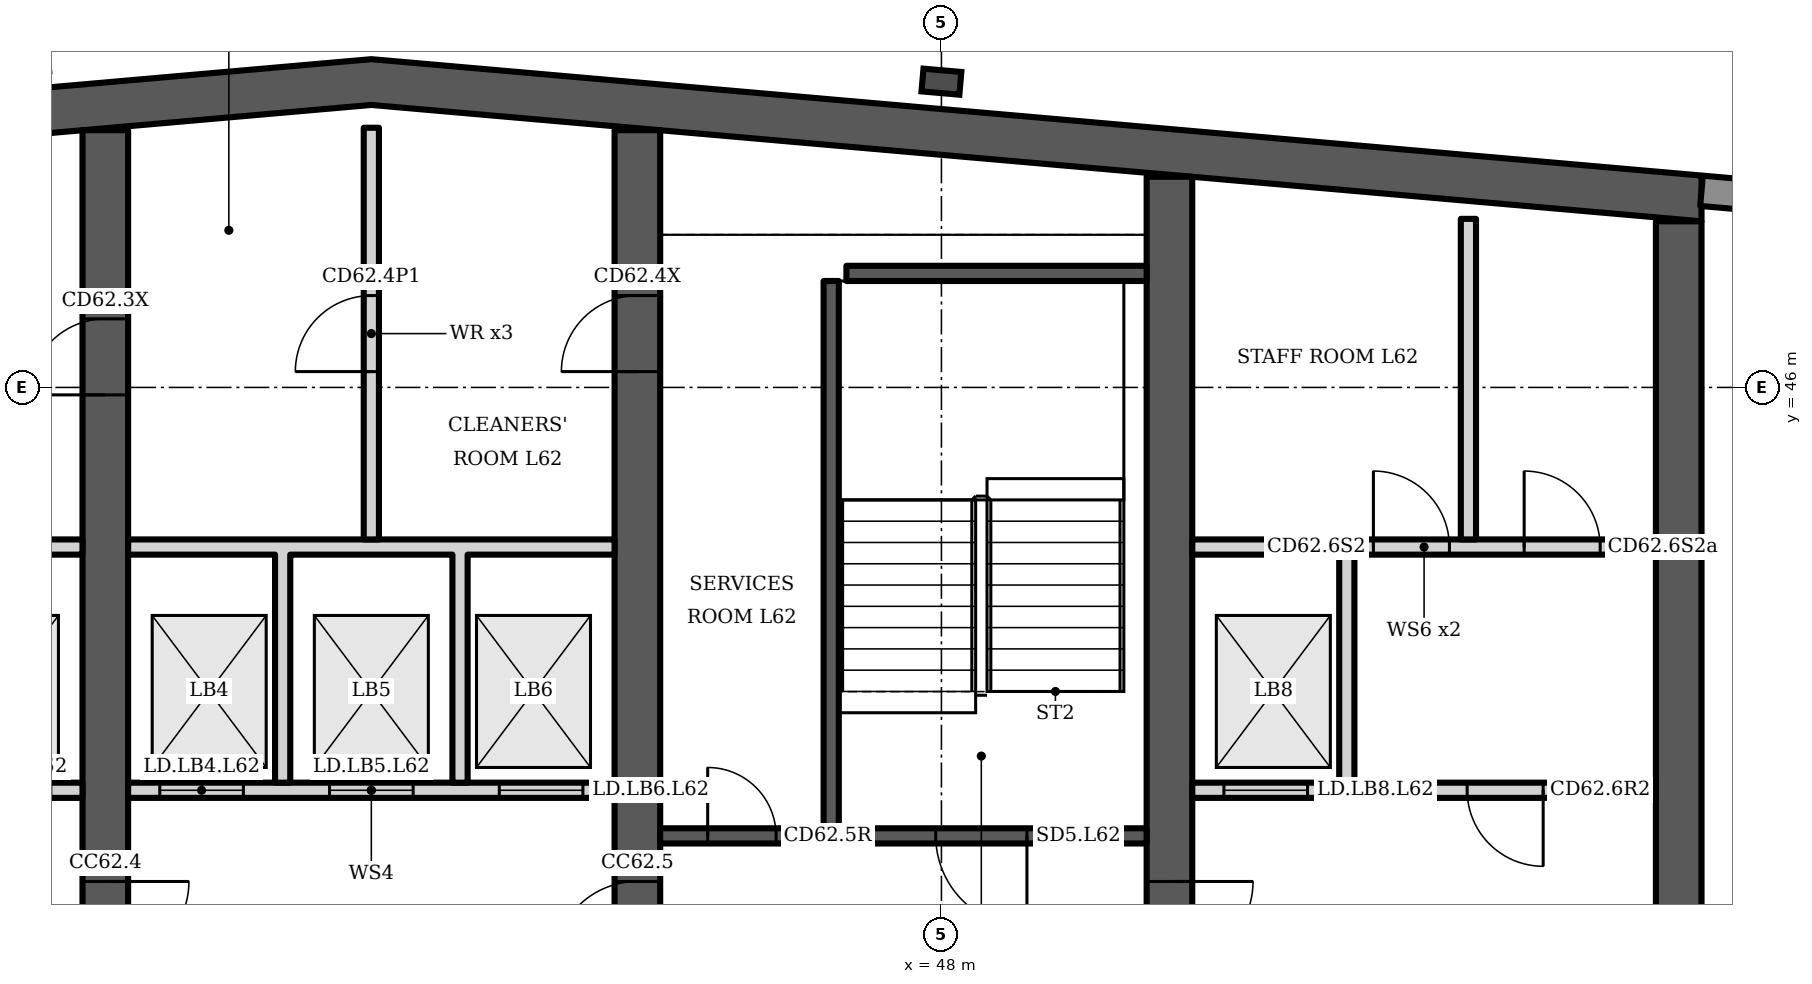
"""IFC4 building model, lengths in metres.
Left out: names, types, materials, properties, quantities, classifications, styles, units other than length and angle.
Written with IfcOpenShell. Run it as: python <this file> out.ifc"""

import sys

from ifc_helpers import new_model, si_unit, direction, frame, frame_2d, origin, origin_2d, place, context, subcontext, project, spatial, polyline, rectangle, i_section, outline, extrude, element, fill, save


model = new_model("IFC4")
c1 = context("Model", 3, precision=1e-05, world=origin(), true_north=direction((0.0, 1.0)))
c2 = subcontext(c1, "Body", "Model", "MODEL_VIEW")
j1 = project(units=[si_unit("LENGTHUNIT", "METRE"), si_unit("PLANEANGLEUNIT", "RADIAN")], contexts=[c1])
p1 = place(None, origin())
s1 = spatial("IfcSite", under=j1, at=p1, CompositionType="ELEMENT")
p2 = place(p1, origin())
s2 = spatial("IfcBuilding", under=s1, at=p2, CompositionType="ELEMENT")
p3 = place(p2, frame((0.0, 0.0, 246.7)))
s3 = spatial("IfcBuildingStorey", under=s2, at=p3, CompositionType="ELEMENT", Elevation=246.7)
p4 = place(p3, origin())
e1 = element("IfcWall", 1, at=p4, inside=s3, PredefinedType="SHEAR", context=c2, shape_type="SweptSolid", body=[
    extrude(outline(polyline([(23.0, 48.185), (40.5, 49.716), (58.0, 48.185), (58.0, 48.787), (40.5, 50.318), (23.0, 48.787), (23.0, 48.185)])), origin(), (0.0, 0.0, 1.0), 3.6),
])
p5 = place(p3, frame((37.0, 34.6, 0.0), z_axis=(0.0, 0.0, 1.0), x_axis=(0.0, 1.0, 0.0)))
e2 = element("IfcWall", 2, at=p5, inside=s3, PredefinedType="SHEAR", context=c2, shape_type="SweptSolid", body=[
    extrude(rectangle(XDim=14.784, YDim=0.6, at=frame_2d((7.392, 0.0))), origin(), (0.0, 0.0, 1.0), 3.6),
])
p6 = place(p5, frame((11.302, 0.0, 0.0)))
e3 = element("IfcOpeningElement", 3, at=p6, cuts=e2, PredefinedType="OPENING", context=c2, shape_type="SweptSolid", body=[
    extrude(rectangle(XDim=1.0, YDim=2.1, at=frame_2d((0.5, 1.05))), frame((0.0, 0.31, 0.0), z_axis=(0.0, -1.0, 0.0), x_axis=(1.0, 0.0, 0.0)), (0.0, 0.0, 1.0), 0.62),
])
p7 = place(p5, frame((3.8, 0.0, 0.0)))
e4 = element("IfcOpeningElement", 4, at=p7, cuts=e2, PredefinedType="OPENING", context=c2, shape_type="SweptSolid", body=[
    extrude(rectangle(XDim=1.1, YDim=2.1, at=frame_2d((0.55, 1.05))), frame((0.0, 0.31, 0.0), z_axis=(0.0, -1.0, 0.0), x_axis=(1.0, 0.0, 0.0)), (0.0, 0.0, 1.0), 0.62),
])
p8 = place(p3, frame((44.0, 34.6, 0.0), z_axis=(0.0, 0.0, 1.0), x_axis=(0.0, 1.0, 0.0)))
e5 = element("IfcWall", 5, at=p8, inside=s3, PredefinedType="SHEAR", context=c2, shape_type="SweptSolid", body=[
    extrude(rectangle(XDim=14.784, YDim=0.6, at=frame_2d((7.392, 0.0))), origin(), (0.0, 0.0, 1.0), 3.6),
])
p9 = place(p8, frame((11.608, 0.0, 0.0)))
e6 = element("IfcOpeningElement", 6, at=p9, cuts=e5, PredefinedType="OPENING", context=c2, shape_type="SweptSolid", body=[
    extrude(rectangle(XDim=1.0, YDim=2.1, at=frame_2d((0.5, 1.05))), frame((0.0, 0.31, 0.0), z_axis=(0.0, -1.0, 0.0), x_axis=(1.0, 0.0, 0.0)), (0.0, 0.0, 1.0), 0.62),
])
p10 = place(p8, frame((3.8, 0.0, 0.0)))
e7 = element("IfcOpeningElement", 7, at=p10, cuts=e5, PredefinedType="OPENING", context=c2, shape_type="SweptSolid", body=[
    extrude(rectangle(XDim=1.1, YDim=2.1, at=frame_2d((0.55, 1.05))), frame((0.0, 0.31, 0.0), z_axis=(0.0, -1.0, 0.0), x_axis=(1.0, 0.0, 0.0)), (0.0, 0.0, 1.0), 0.62),
])
p11 = place(p3, frame((51.0, 34.6, 0.0), z_axis=(0.0, 0.0, 1.0), x_axis=(0.0, 1.0, 0.0)))
e8 = element("IfcWall", 8, at=p11, inside=s3, PredefinedType="SHEAR", context=c2, shape_type="SweptSolid", body=[
    extrude(rectangle(XDim=14.171, YDim=0.6, at=frame_2d((7.085, 0.0))), origin(), (0.0, 0.0, 1.0), 3.6),
])
p12 = place(p11, frame((3.8, 0.0, 0.0)))
e9 = element("IfcOpeningElement", 9, at=p12, cuts=e8, PredefinedType="OPENING", context=c2, shape_type="SweptSolid", body=[
    extrude(rectangle(XDim=1.1, YDim=2.1, at=frame_2d((0.55, 1.05))), frame((0.0, 0.31, 0.0), z_axis=(0.0, -1.0, 0.0), x_axis=(1.0, 0.0, 0.0)), (0.0, 0.0, 1.0), 0.62),
])
p13 = place(p3, frame((57.7, 34.6, 0.0), z_axis=(0.0, 0.0, 1.0), x_axis=(0.0, 1.0, 0.0)))
e10 = element("IfcWall", 10, at=p13, inside=s3, PredefinedType="SHEAR", context=c2, shape_type="SweptSolid", body=[
    extrude(rectangle(XDim=13.585, YDim=0.6, at=frame_2d((6.792, 0.0))), origin(), (0.0, 0.0, 1.0), 3.6),
])
p14 = place(p3, frame((48.0, 50.022, 0.0), z_axis=(0.0, 0.0, 1.0), x_axis=(0.087156, 0.996197, 0.0)))
e11 = element("IfcColumn", 11, at=p14, inside=s3, PredefinedType="COLUMN", context=c2, shape_type="SweptSolid", body=[
    extrude(i_section(OverallWidth=0.3, OverallDepth=0.5, WebThickness=0.014, FlangeThickness=0.028, FilletRadius=0.027, at=origin_2d()), origin(), (0.0, 0.0, 1.0), 3.6),
])
p15 = place(p3, frame((60.983, 48.326, 0.0), z_axis=(0.0, 0.0, 1.0), x_axis=(-0.996194, 0.087168, 0.0)))
e12 = element("IfcWall", 12, at=p15, inside=s3, PredefinedType="SOLIDWALL", context=c2, shape_type="SweptSolid", body=[
    extrude(rectangle(XDim=2.994, YDim=0.4, at=frame_2d((1.497, 0.0))), origin(), (0.0, 0.0, 1.0), 3.2),
])
p16 = place(p3, frame((30.3, 40.7, 0.0), z_axis=(0.0, 0.0, 1.0), x_axis=(1.0, 0.0, 0.0)))
e13 = element("IfcWall", 13, at=p16, inside=s3, PredefinedType="PARTITIONING", context=c2, shape_type="SweptSolid", body=[
    extrude(rectangle(XDim=6.4, YDim=0.2, at=frame_2d((3.2, 0.0))), origin(), (0.0, 0.0, 1.0), 3.2),
])
p17 = place(p16, frame((0.417, 0.0, 0.0)))
e14 = element("IfcOpeningElement", 14, at=p17, cuts=e13, PredefinedType="OPENING", context=c2, shape_type="SweptSolid", body=[
    extrude(rectangle(XDim=1.1, YDim=2.1, at=frame_2d((0.55, 1.05))), frame((0.0, 0.11, 0.0), z_axis=(0.0, -1.0, 0.0), x_axis=(1.0, 0.0, 0.0)), (0.0, 0.0, 1.0), 0.22),
])
p18 = place(p16, frame((2.65, 0.0, 0.0)))
e15 = element("IfcOpeningElement", 15, at=p18, cuts=e13, PredefinedType="OPENING", context=c2, shape_type="SweptSolid", body=[
    extrude(rectangle(XDim=1.1, YDim=2.1, at=frame_2d((0.55, 1.05))), frame((0.0, 0.11, 0.0), z_axis=(0.0, -1.0, 0.0), x_axis=(1.0, 0.0, 0.0)), (0.0, 0.0, 1.0), 0.22),
])
p19 = place(p16, frame((4.883, 0.0, 0.0)))
e16 = element("IfcOpeningElement", 16, at=p19, cuts=e13, PredefinedType="OPENING", context=c2, shape_type="SweptSolid", body=[
    extrude(rectangle(XDim=1.1, YDim=2.1, at=frame_2d((0.55, 1.05))), frame((0.0, 0.11, 0.0), z_axis=(0.0, -1.0, 0.0), x_axis=(1.0, 0.0, 0.0)), (0.0, 0.0, 1.0), 0.22),
])
p20 = place(p3, frame((0.0, 0.0, -0.0)))
e17 = element("IfcWall", 17, at=p20, inside=s3, PredefinedType="PARTITIONING", context=c2, shape_type="SweptSolid", body=[
    extrude(outline(polyline([(32.433, 40.8), (32.233, 40.8), (32.233, 43.8), (30.3, 43.8), (30.3, 44.0), (36.7, 44.0), (36.7, 43.8), (34.767, 43.8), (34.767, 40.8), (34.567, 40.8), (34.567, 43.8), (32.433, 43.8), (32.433, 40.8)])), origin(), (0.0, 0.0, 1.0), 3.2),
])
p21 = place(p3, frame((37.3, 40.7, 0.0), z_axis=(0.0, 0.0, 1.0), x_axis=(1.0, 0.0, 0.0)))
e18 = element("IfcWall", 18, at=p21, inside=s3, PredefinedType="PARTITIONING", context=c2, shape_type="SweptSolid", body=[
    extrude(rectangle(XDim=6.4, YDim=0.2, at=frame_2d((3.2, 0.0))), origin(), (0.0, 0.0, 1.0), 3.2),
])
p22 = place(p21, frame((0.417, 0.0, 0.0)))
e19 = element("IfcOpeningElement", 19, at=p22, cuts=e18, PredefinedType="OPENING", context=c2, shape_type="SweptSolid", body=[
    extrude(rectangle(XDim=1.1, YDim=2.1, at=frame_2d((0.55, 1.05))), frame((0.0, 0.11, 0.0), z_axis=(0.0, -1.0, 0.0), x_axis=(1.0, 0.0, 0.0)), (0.0, 0.0, 1.0), 0.22),
])
p23 = place(p21, frame((2.65, 0.0, 0.0)))
e20 = element("IfcOpeningElement", 20, at=p23, cuts=e18, PredefinedType="OPENING", context=c2, shape_type="SweptSolid", body=[
    extrude(rectangle(XDim=1.1, YDim=2.1, at=frame_2d((0.55, 1.05))), frame((0.0, 0.11, 0.0), z_axis=(0.0, -1.0, 0.0), x_axis=(1.0, 0.0, 0.0)), (0.0, 0.0, 1.0), 0.22),
])
p24 = place(p21, frame((4.883, 0.0, 0.0)))
e21 = element("IfcOpeningElement", 21, at=p24, cuts=e18, PredefinedType="OPENING", context=c2, shape_type="SweptSolid", body=[
    extrude(rectangle(XDim=1.1, YDim=2.1, at=frame_2d((0.55, 1.05))), frame((0.0, 0.11, 0.0), z_axis=(0.0, -1.0, 0.0), x_axis=(1.0, 0.0, 0.0)), (0.0, 0.0, 1.0), 0.22),
])
p25 = place(p3, frame((0.0, 0.0, -0.0)))
e22 = element("IfcWall", 22, at=p25, inside=s3, PredefinedType="PARTITIONING", context=c2, shape_type="SweptSolid", body=[
    extrude(outline(polyline([(39.433, 40.8), (39.233, 40.8), (39.233, 43.8), (37.3, 43.8), (37.3, 44.0), (43.7, 44.0), (43.7, 43.8), (41.767, 43.8), (41.767, 40.8), (41.567, 40.8), (41.567, 43.8), (39.433, 43.8), (39.433, 40.8)])), origin(), (0.0, 0.0, 1.0), 3.2),
])
p26 = place(p3, frame((40.5, 44.0, 0.0), z_axis=(0.0, 0.0, 1.0), x_axis=(0.0, 1.0, 0.0)))
e23 = element("IfcWall", 23, at=p26, inside=s3, PredefinedType="PARTITIONING", context=c2, shape_type="SweptSolid", body=[
    extrude(rectangle(XDim=5.416, YDim=0.2, at=frame_2d((2.708, 0.0))), origin(), (0.0, 0.0, 1.0), 3.2),
])
p27 = place(p26, frame((2.208, 0.0, 0.0)))
e24 = element("IfcOpeningElement", 24, at=p27, cuts=e23, PredefinedType="OPENING", context=c2, shape_type="SweptSolid", body=[
    extrude(rectangle(XDim=1.0, YDim=2.1, at=frame_2d((0.5, 1.05))), frame((0.0, 0.11, 0.0), z_axis=(0.0, -1.0, 0.0), x_axis=(1.0, 0.0, 0.0)), (0.0, 0.0, 1.0), 0.22),
])
p28 = place(p3, frame((44.3, 40.1, 0.0), z_axis=(0.0, 0.0, 1.0), x_axis=(1.0, 0.0, 0.0)))
e25 = element("IfcWall", 25, at=p28, inside=s3, PredefinedType="SHEAR", context=c2, shape_type="SweptSolid", body=[
    extrude(rectangle(XDim=6.4, YDim=0.2, at=frame_2d((3.2, 0.0))), origin(), (0.0, 0.0, 1.0), 3.2),
])
p29 = place(p28, frame((3.625, 0.0, 0.0)))
e26 = element("IfcOpeningElement", 26, at=p29, cuts=e25, PredefinedType="OPENING", context=c2, shape_type="SweptSolid", body=[
    extrude(rectangle(XDim=1.2, YDim=2.1, at=frame_2d((0.6, 1.05))), frame((0.0, 0.11, 0.0), z_axis=(0.0, -1.0, 0.0), x_axis=(1.0, 0.0, 0.0)), (0.0, 0.0, 1.0), 0.22),
])
p30 = place(p28, frame((0.625, 0.0, 0.0)))
e27 = element("IfcOpeningElement", 27, at=p30, cuts=e25, PredefinedType="OPENING", context=c2, shape_type="SweptSolid", body=[
    extrude(rectangle(XDim=0.9, YDim=2.1, at=frame_2d((0.45, 1.05))), frame((0.0, 0.11, 0.0), z_axis=(0.0, -1.0, 0.0), x_axis=(1.0, 0.0, 0.0)), (0.0, 0.0, 1.0), 0.22),
])
p31 = place(p3, frame((46.55, 40.2, 0.0), z_axis=(0.0, 0.0, 1.0), x_axis=(0.0, 1.0, 0.0)))
e28 = element("IfcWall", 28, at=p31, inside=s3, PredefinedType="SHEAR", context=c2, shape_type="SweptSolid", body=[
    extrude(rectangle(XDim=7.2, YDim=0.2, at=frame_2d((3.6, 0.0))), origin(), (0.0, 0.0, 1.0), 3.2),
])
p32 = place(p3, frame((46.75, 47.5, 0.0), z_axis=(0.0, 0.0, 1.0), x_axis=(1.0, 0.0, 0.0)))
e29 = element("IfcWall", 29, at=p32, inside=s3, PredefinedType="SHEAR", context=c2, shape_type="SweptSolid", body=[
    extrude(rectangle(XDim=3.95, YDim=0.2, at=frame_2d((1.975, 0.0))), origin(), (0.0, 0.0, 1.0), 3.2),
])
p33 = place(p3, frame((51.3, 40.7, 0.0), z_axis=(0.0, 0.0, 1.0), x_axis=(1.0, 0.0, 0.0)))
e30 = element("IfcWall", 30, at=p33, inside=s3, PredefinedType="PARTITIONING", context=c2, shape_type="SweptSolid", body=[
    extrude(rectangle(XDim=6.1, YDim=0.2, at=frame_2d((3.05, 0.0))), origin(), (0.0, 0.0, 1.0), 3.2),
])
p34 = place(p33, frame((0.417, 0.0, 0.0)))
e31 = element("IfcOpeningElement", 31, at=p34, cuts=e30, PredefinedType="OPENING", context=c2, shape_type="SweptSolid", body=[
    extrude(rectangle(XDim=1.1, YDim=2.1, at=frame_2d((0.55, 1.05))), frame((0.0, 0.11, 0.0), z_axis=(0.0, -1.0, 0.0), x_axis=(1.0, 0.0, 0.0)), (0.0, 0.0, 1.0), 0.22),
])
p35 = place(p33, frame((3.617, 0.0, 0.0)))
e32 = element("IfcOpeningElement", 32, at=p35, cuts=e30, PredefinedType="OPENING", context=c2, shape_type="SweptSolid", body=[
    extrude(rectangle(XDim=1.0, YDim=2.1, at=frame_2d((0.5, 1.05))), frame((0.0, 0.11, 0.0), z_axis=(0.0, -1.0, 0.0), x_axis=(1.0, 0.0, 0.0)), (0.0, 0.0, 1.0), 0.22),
])
p36 = place(p3, frame((51.3, 43.9, 0.0), z_axis=(0.0, 0.0, 1.0), x_axis=(1.0, 0.0, 0.0)))
e33 = element("IfcWall", 33, at=p36, inside=s3, PredefinedType="PARTITIONING", context=c2, shape_type="SweptSolid", body=[
    extrude(rectangle(XDim=6.1, YDim=0.2, at=frame_2d((3.05, 0.0))), origin(), (0.0, 0.0, 1.0), 3.2),
])
p37 = place(p36, frame((2.383, 0.0, 0.0)))
e34 = element("IfcOpeningElement", 34, at=p37, cuts=e33, PredefinedType="OPENING", context=c2, shape_type="SweptSolid", body=[
    extrude(rectangle(XDim=1.0, YDim=2.1, at=frame_2d((0.5, 1.05))), frame((0.0, 0.11, 0.0), z_axis=(0.0, -1.0, 0.0), x_axis=(1.0, 0.0, 0.0)), (0.0, 0.0, 1.0), 0.22),
])
p38 = place(p36, frame((4.367, 0.0, 0.0)))
e35 = element("IfcOpeningElement", 35, at=p38, cuts=e33, PredefinedType="OPENING", context=c2, shape_type="SweptSolid", body=[
    extrude(rectangle(XDim=1.0, YDim=2.1, at=frame_2d((0.5, 1.05))), frame((0.0, 0.11, 0.0), z_axis=(0.0, -1.0, 0.0), x_axis=(1.0, 0.0, 0.0)), (0.0, 0.0, 1.0), 0.22),
])
p39 = place(p3, frame((0.0, 0.0, -0.0)))
e36 = element("IfcWall", 36, at=p39, inside=s3, PredefinedType="PARTITIONING", context=c2, shape_type="SweptSolid", body=[
    extrude(outline(polyline([(53.433, 40.8), (53.433, 43.8), (53.233, 43.8), (53.233, 40.8), (53.433, 40.8)])), origin(), (0.0, 0.0, 1.0), 3.2),
])
p40 = place(p3, frame((54.933, 44.0, 0.0), z_axis=(0.0, 0.0, 1.0), x_axis=(0.0, 1.0, 0.0)))
e37 = element("IfcWall", 37, at=p40, inside=s3, PredefinedType="PARTITIONING", context=c2, shape_type="SweptSolid", body=[
    extrude(rectangle(XDim=4.218, YDim=0.2, at=frame_2d((2.109, 0.0))), origin(), (0.0, 0.0, 1.0), 3.2),
])
p41 = place(p6, origin())
e38 = element("IfcDoor", 38, at=p41, inside=s3, OperationType="SINGLE_SWING_LEFT", PredefinedType="DOOR", context=c2, shape_type="SweptSolid", body=[
    extrude(rectangle(XDim=1.0, YDim=2.1, at=frame_2d((0.5, 1.05))), frame((0.0, 0.025, 0.0), z_axis=(0.0, -1.0, 0.0), x_axis=(1.0, 0.0, 0.0)), (0.0, 0.0, 1.0), 0.05),
])
fill(e3, e38)
p42 = place(p22, origin())
e39 = element("IfcDoor", 39, at=p42, inside=s3, OperationType="DOUBLE_DOOR_SLIDING", PredefinedType="DOOR", context=c2, shape_type="SweptSolid", body=[
    extrude(rectangle(XDim=1.1, YDim=2.1, at=frame_2d((0.55, 1.05))), frame((0.0, 0.025, 0.0), z_axis=(0.0, -1.0, 0.0), x_axis=(1.0, 0.0, 0.0)), (0.0, 0.0, 1.0), 0.05),
])
fill(e19, e39)
p43 = place(p23, origin())
e40 = element("IfcDoor", 40, at=p43, inside=s3, OperationType="DOUBLE_DOOR_SLIDING", PredefinedType="DOOR", context=c2, shape_type="SweptSolid", body=[
    extrude(rectangle(XDim=1.1, YDim=2.1, at=frame_2d((0.55, 1.05))), frame((0.0, 0.025, 0.0), z_axis=(0.0, -1.0, 0.0), x_axis=(1.0, 0.0, 0.0)), (0.0, 0.0, 1.0), 0.05),
])
fill(e20, e40)
p44 = place(p24, origin())
e41 = element("IfcDoor", 41, at=p44, inside=s3, OperationType="DOUBLE_DOOR_SLIDING", PredefinedType="DOOR", context=c2, shape_type="SweptSolid", body=[
    extrude(rectangle(XDim=1.1, YDim=2.1, at=frame_2d((0.55, 1.05))), frame((0.0, 0.025, 0.0), z_axis=(0.0, -1.0, 0.0), x_axis=(1.0, 0.0, 0.0)), (0.0, 0.0, 1.0), 0.05),
])
fill(e21, e41)
p45 = place(p27, origin())
e42 = element("IfcDoor", 42, at=p45, inside=s3, OperationType="SINGLE_SWING_LEFT", PredefinedType="DOOR", context=c2, shape_type="SweptSolid", body=[
    extrude(rectangle(XDim=1.0, YDim=2.1, at=frame_2d((0.5, 1.05))), frame((0.0, 0.025, 0.0), z_axis=(0.0, -1.0, 0.0), x_axis=(1.0, 0.0, 0.0)), (0.0, 0.0, 1.0), 0.05),
])
fill(e24, e42)
p46 = place(p9, origin())
e43 = element("IfcDoor", 43, at=p46, inside=s3, OperationType="SINGLE_SWING_LEFT", PredefinedType="DOOR", context=c2, shape_type="SweptSolid", body=[
    extrude(rectangle(XDim=1.0, YDim=2.1, at=frame_2d((0.5, 1.05))), frame((0.0, 0.025, 0.0), z_axis=(0.0, -1.0, 0.0), x_axis=(1.0, 0.0, 0.0)), (0.0, 0.0, 1.0), 0.05),
])
fill(e6, e43)
p47 = place(p29, origin())
e44 = element("IfcDoor", 44, at=p47, inside=s3, OperationType="SINGLE_SWING_RIGHT", PredefinedType="DOOR", context=c2, shape_type="SweptSolid", body=[
    extrude(rectangle(XDim=1.2, YDim=2.1, at=frame_2d((0.6, 1.05))), frame((0.0, 0.025, 0.0), z_axis=(0.0, -1.0, 0.0), x_axis=(1.0, 0.0, 0.0)), (0.0, 0.0, 1.0), 0.05),
])
fill(e26, e44)
p48 = place(p30, origin())
e45 = element("IfcDoor", 45, at=p48, inside=s3, OperationType="SINGLE_SWING_LEFT", PredefinedType="DOOR", context=c2, shape_type="SweptSolid", body=[
    extrude(rectangle(XDim=0.9, YDim=2.1, at=frame_2d((0.45, 1.05))), frame((0.0, 0.025, 0.0), z_axis=(0.0, -1.0, 0.0), x_axis=(1.0, 0.0, 0.0)), (0.0, 0.0, 1.0), 0.05),
])
fill(e27, e45)
p49 = place(p34, origin())
e46 = element("IfcDoor", 46, at=p49, inside=s3, OperationType="DOUBLE_DOOR_SLIDING", PredefinedType="DOOR", context=c2, shape_type="SweptSolid", body=[
    extrude(rectangle(XDim=1.1, YDim=2.1, at=frame_2d((0.55, 1.05))), frame((0.0, 0.025, 0.0), z_axis=(0.0, -1.0, 0.0), x_axis=(1.0, 0.0, 0.0)), (0.0, 0.0, 1.0), 0.05),
])
fill(e31, e46)
p50 = place(p35, origin())
e47 = element("IfcDoor", 47, at=p50, inside=s3, OperationType="SINGLE_SWING_RIGHT", PredefinedType="DOOR", context=c2, shape_type="SweptSolid", body=[
    extrude(rectangle(XDim=1.0, YDim=2.1, at=frame_2d((0.5, 1.05))), frame((0.0, 0.025, 0.0), z_axis=(0.0, -1.0, 0.0), x_axis=(1.0, 0.0, 0.0)), (0.0, 0.0, 1.0), 0.05),
])
fill(e32, e47)
p51 = place(p37, origin())
e48 = element("IfcDoor", 48, at=p51, inside=s3, OperationType="SINGLE_SWING_LEFT", PredefinedType="DOOR", context=c2, shape_type="SweptSolid", body=[
    extrude(rectangle(XDim=1.0, YDim=2.1, at=frame_2d((0.5, 1.05))), frame((0.0, 0.025, 0.0), z_axis=(0.0, -1.0, 0.0), x_axis=(1.0, 0.0, 0.0)), (0.0, 0.0, 1.0), 0.05),
])
fill(e34, e48)
p52 = place(p38, origin())
e49 = element("IfcDoor", 49, at=p52, inside=s3, OperationType="SINGLE_SWING_LEFT", PredefinedType="DOOR", context=c2, shape_type="SweptSolid", body=[
    extrude(rectangle(XDim=1.0, YDim=2.1, at=frame_2d((0.5, 1.05))), frame((0.0, 0.025, 0.0), z_axis=(0.0, -1.0, 0.0), x_axis=(1.0, 0.0, 0.0)), (0.0, 0.0, 1.0), 0.05),
])
fill(e35, e49)
p53 = place(p7, origin())
e50 = element("IfcDoor", 50, at=p53, inside=s3, OperationType="SINGLE_SWING_RIGHT", PredefinedType="DOOR", context=c2, shape_type="SweptSolid", body=[
    extrude(rectangle(XDim=1.1, YDim=2.1, at=frame_2d((0.55, 1.05))), frame((0.0, 0.025, 0.0), z_axis=(0.0, -1.0, 0.0), x_axis=(1.0, 0.0, 0.0)), (0.0, 0.0, 1.0), 0.05),
])
fill(e4, e50)
p54 = place(p10, origin())
e51 = element("IfcDoor", 51, at=p54, inside=s3, OperationType="SINGLE_SWING_LEFT", PredefinedType="DOOR", context=c2, shape_type="SweptSolid", body=[
    extrude(rectangle(XDim=1.1, YDim=2.1, at=frame_2d((0.55, 1.05))), frame((0.0, 0.025, 0.0), z_axis=(0.0, -1.0, 0.0), x_axis=(1.0, 0.0, 0.0)), (0.0, 0.0, 1.0), 0.05),
])
fill(e7, e51)
p55 = place(p12, origin())
e52 = element("IfcDoor", 52, at=p55, inside=s3, OperationType="SINGLE_SWING_RIGHT", PredefinedType="DOOR", context=c2, shape_type="SweptSolid", body=[
    extrude(rectangle(XDim=1.1, YDim=2.1, at=frame_2d((0.55, 1.05))), frame((0.0, 0.025, 0.0), z_axis=(0.0, -1.0, 0.0), x_axis=(1.0, 0.0, 0.0)), (0.0, 0.0, 1.0), 0.05),
])
fill(e9, e52)
save(model, sys.argv[1])
